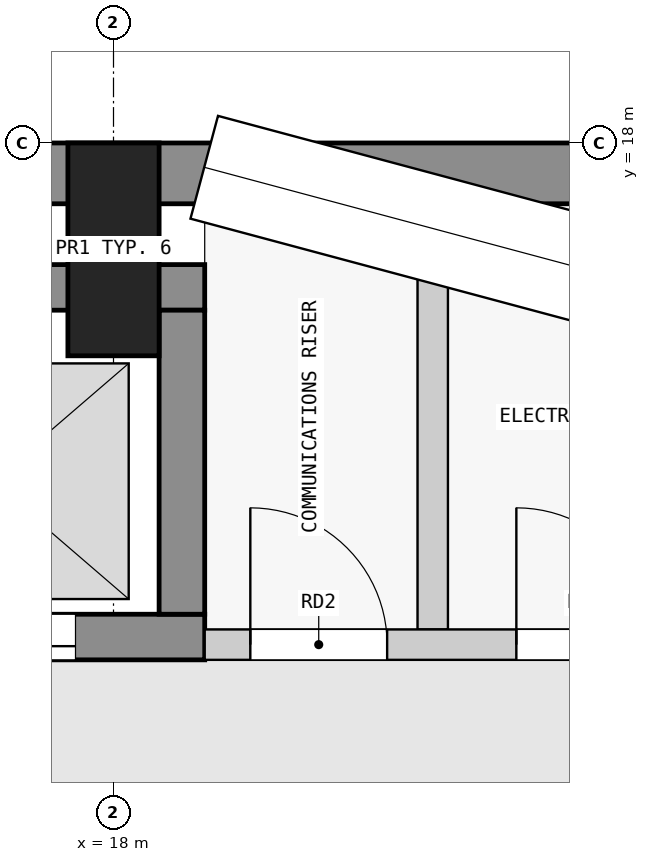
"""IFC4 building model, lengths in metres.
Left out: names, types, materials, properties, quantities, classifications, styles, units other than length and angle.
Written with IfcOpenShell. Run it as: python <this file> out.ifc"""

import sys

from ifc_helpers import new_model, si_unit, direction, frame, frame_2d, origin, origin_2d, place, context, subcontext, project, spatial, rectangle, extrude, element, fill, save


model = new_model("IFC4")
c1 = context("Model", 3, precision=1e-05, world=origin(), true_north=direction((0.0, 1.0)))
c2 = subcontext(c1, "Body", "Model", "MODEL_VIEW")
j1 = project(units=[si_unit("LENGTHUNIT", "METRE"), si_unit("PLANEANGLEUNIT", "RADIAN")], contexts=[c1])
p1 = place(None, origin())
s1 = spatial("IfcSite", under=j1, at=p1, CompositionType="ELEMENT")
p2 = place(p1, origin())
s2 = spatial("IfcBuilding", under=s1, at=p2, CompositionType="ELEMENT")
p3 = place(p2, frame((0.0, 0.0, 298.4)))
s3 = spatial("IfcBuildingStorey", under=s2, at=p3, CompositionType="ELEMENT", Elevation=298.4)
p4 = place(p3, frame((18.0, 17.3, 0.0), z_axis=(0.0, 0.0, 1.0), x_axis=(1.0, 0.0, 0.0)))
e1 = element("IfcColumn", 1, at=p4, inside=s3, PredefinedType="COLUMN", context=c2, shape_type="SweptSolid", body=[
    extrude(rectangle(XDim=0.6, YDim=1.4, at=origin_2d()), origin(), (0.0, 0.0, 1.0), 3.5),
])
p5 = place(p3, frame((1.9, 17.8, 0.0), z_axis=(0.0, 0.0, 1.0), x_axis=(1.0, 0.0, 0.0)))
e2 = element("IfcWall", 2, at=p5, inside=s3, PredefinedType="SHEAR", context=c2, shape_type="SweptSolid", body=[
    extrude(rectangle(XDim=20.6, YDim=0.4, at=frame_2d((10.3, 0.0))), origin(), (0.0, 0.0, 1.0), 3.05),
])
p6 = place(p3, frame((10.8, 17.05, 0.0), z_axis=(0.0, 0.0, 1.0), x_axis=(1.0, 0.0, 0.0)))
e3 = element("IfcWall", 3, at=p6, inside=s3, PredefinedType="SHEAR", context=c2, shape_type="SweptSolid", body=[
    extrude(rectangle(XDim=7.8, YDim=0.3, at=frame_2d((3.9, 0.0))), origin(), (0.0, 0.0, 1.0), 3.05),
])
p7 = place(p3, frame((10.8, 14.75, 0.0), z_axis=(0.0, 0.0, 1.0), x_axis=(1.0, 0.0, 0.0)))
e4 = element("IfcWall", 4, at=p7, inside=s3, PredefinedType="SHEAR", context=c2, shape_type="SweptSolid", body=[
    extrude(rectangle(XDim=7.8, YDim=0.3, at=frame_2d((3.9, 0.0))), origin(), (0.0, 0.0, 1.0), 3.05),
])
p8 = place(p7, frame((0.85, 0.0, 0.0)))
e5 = element("IfcOpeningElement", 5, at=p8, cuts=e4, PredefinedType="OPENING", context=c2, shape_type="SweptSolid", body=[
    extrude(rectangle(XDim=1.1, YDim=2.1, at=frame_2d((0.55, 1.05))), frame((0.0, 0.16, 0.0), z_axis=(0.0, -1.0, 0.0), x_axis=(1.0, 0.0, 0.0)), (0.0, 0.0, 1.0), 0.32),
])
p9 = place(p7, frame((3.35, 0.0, 0.0)))
e6 = element("IfcOpeningElement", 6, at=p9, cuts=e4, PredefinedType="OPENING", context=c2, shape_type="SweptSolid", body=[
    extrude(rectangle(XDim=1.1, YDim=2.1, at=frame_2d((0.55, 1.05))), frame((0.0, 0.16, 0.0), z_axis=(0.0, -1.0, 0.0), x_axis=(1.0, 0.0, 0.0)), (0.0, 0.0, 1.0), 0.32),
])
p10 = place(p7, frame((5.85, 0.0, 0.0)))
e7 = element("IfcOpeningElement", 7, at=p10, cuts=e4, PredefinedType="OPENING", context=c2, shape_type="SweptSolid", body=[
    extrude(rectangle(XDim=1.1, YDim=2.1, at=frame_2d((0.55, 1.05))), frame((0.0, 0.16, 0.0), z_axis=(0.0, -1.0, 0.0), x_axis=(1.0, 0.0, 0.0)), (0.0, 0.0, 1.0), 0.32),
])
p11 = place(p3, frame((18.45, 14.9, 0.0), z_axis=(0.0, 0.0, 1.0), x_axis=(0.0, 1.0, 0.0)))
e8 = element("IfcWall", 8, at=p11, inside=s3, PredefinedType="SHEAR", context=c2, shape_type="SweptSolid", body=[
    extrude(rectangle(XDim=2.0, YDim=0.3, at=frame_2d((1.0, 0.0))), origin(), (0.0, 0.0, 1.0), 3.05),
])
p12 = place(p3, frame((18.6, 14.7, 0.0), z_axis=(0.0, 0.0, 1.0), x_axis=(1.0, 0.0, 0.0)))
e9 = element("IfcWall", 9, at=p12, inside=s3, PredefinedType="PARTITIONING", context=c2, shape_type="SweptSolid", body=[
    extrude(rectangle(XDim=3.5, YDim=0.2, at=frame_2d((1.75, 0.0))), origin(), (0.0, 0.0, 1.0), 3.05),
])
p13 = place(p12, frame((0.3, 0.0, 0.0)))
e10 = element("IfcOpeningElement", 10, at=p13, cuts=e9, PredefinedType="OPENING", context=c2, shape_type="SweptSolid", body=[
    extrude(rectangle(XDim=0.9, YDim=2.1, at=frame_2d((0.45, 1.05))), frame((0.0, 0.11, 0.0), z_axis=(0.0, -1.0, 0.0), x_axis=(1.0, 0.0, 0.0)), (0.0, 0.0, 1.0), 0.22),
])
p14 = place(p12, frame((2.05, 0.0, 0.0)))
e11 = element("IfcOpeningElement", 11, at=p14, cuts=e9, PredefinedType="OPENING", context=c2, shape_type="SweptSolid", body=[
    extrude(rectangle(XDim=0.9, YDim=2.1, at=frame_2d((0.45, 1.05))), frame((0.0, 0.11, 0.0), z_axis=(0.0, -1.0, 0.0), x_axis=(1.0, 0.0, 0.0)), (0.0, 0.0, 1.0), 0.22),
])
p15 = place(p3, frame((20.1, 14.8, 0.0), z_axis=(0.0, 0.0, 1.0), x_axis=(0.0, 1.0, 0.0)))
e12 = element("IfcWall", 12, at=p15, inside=s3, PredefinedType="PARTITIONING", context=c2, shape_type="SweptSolid", body=[
    extrude(rectangle(XDim=2.8, YDim=0.2, at=frame_2d((1.4, 0.0))), origin(), (0.0, 0.0, 1.0), 3.05),
])
p16 = place(p10, origin())
e13 = element("IfcDoor", 13, at=p16, inside=s3, OperationType="DOUBLE_DOOR_SLIDING", PredefinedType="DOOR", context=c2, shape_type="SweptSolid", body=[
    extrude(rectangle(XDim=1.1, YDim=2.1, at=frame_2d((0.55, 1.05))), frame((0.0, 0.025, 0.0), z_axis=(0.0, -1.0, 0.0), x_axis=(1.0, 0.0, 0.0)), (0.0, 0.0, 1.0), 0.05),
])
fill(e7, e13)
p17 = place(p13, origin())
e14 = element("IfcDoor", 14, at=p17, inside=s3, OperationType="SINGLE_SWING_LEFT", PredefinedType="DOOR", context=c2, shape_type="SweptSolid", body=[
    extrude(rectangle(XDim=0.9, YDim=2.1, at=frame_2d((0.45, 1.05))), frame((0.0, 0.025, 0.0), z_axis=(0.0, -1.0, 0.0), x_axis=(1.0, 0.0, 0.0)), (0.0, 0.0, 1.0), 0.05),
])
fill(e10, e14)
p18 = place(p14, origin())
e15 = element("IfcDoor", 15, at=p18, inside=s3, OperationType="SINGLE_SWING_LEFT", PredefinedType="DOOR", context=c2, shape_type="SweptSolid", body=[
    extrude(rectangle(XDim=0.9, YDim=2.1, at=frame_2d((0.45, 1.05))), frame((0.0, 0.025, 0.0), z_axis=(0.0, -1.0, 0.0), x_axis=(1.0, 0.0, 0.0)), (0.0, 0.0, 1.0), 0.05),
])
fill(e11, e15)
save(model, sys.argv[1])
